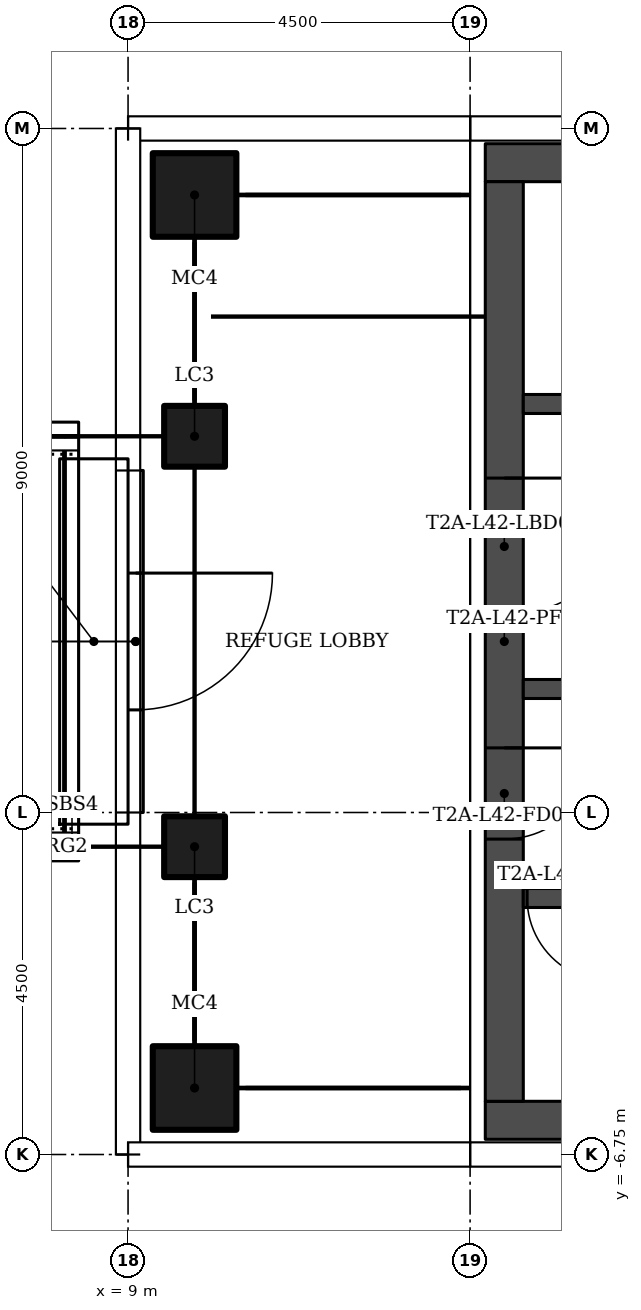
"""IFC4 building model, lengths in metres.
Left out: names, types, materials, properties, quantities, classifications, styles, units other than length and angle.
Written with IfcOpenShell. Run it as: python <this file> out.ifc"""

import sys

from ifc_helpers import new_model, si_unit, direction, frame, frame_2d, origin, origin_2d, place, context, subcontext, project, spatial, rectangle, hollow_rectangle, extrude, element, fill, save


model = new_model("IFC4")
c1 = context("Model", 3, precision=1e-05, world=origin(), true_north=direction((0.0, 1.0)))
c2 = subcontext(c1, "Body", "Model", "MODEL_VIEW")
j1 = project(units=[si_unit("LENGTHUNIT", "METRE"), si_unit("PLANEANGLEUNIT", "RADIAN")], contexts=[c1])
p1 = place(None, origin())
s1 = spatial("IfcSite", under=j1, at=p1, CompositionType="ELEMENT")
p2 = place(p1, origin())
s2 = spatial("IfcBuilding", under=s1, at=p2, CompositionType="ELEMENT")
p3 = place(p2, frame((0.0, 0.0, 177.9)))
s3 = spatial("IfcBuildingStorey", under=s2, at=p3, CompositionType="ELEMENT", Elevation=177.9)
for number, where in (
    (1, (9.875, -5.875, 0.0)),
    (2, (9.875, 5.875, 0.0)),
):
    element("IfcColumn", number, at=place(p3, frame(where)), inside=s3, PredefinedType="COLUMN", context=c2, shape_type="SweptSolid", body=[
        extrude(hollow_rectangle(XDim=1.1, YDim=1.1, WallThickness=0.04, at=origin_2d()), origin(), (0.0, 0.0, 1.0), 4.45),
    ])
for number, where in (
    (3, (9.875, -2.7, 0.0)),
    (4, (9.875, 2.7, 0.0)),
):
    element("IfcColumn", number, at=place(p3, frame(where)), inside=s3, PredefinedType="COLUMN", context=c2, shape_type="SweptSolid", body=[
        extrude(hollow_rectangle(XDim=0.8, YDim=0.8, WallThickness=0.03, at=origin_2d()), origin(), (0.0, 0.0, 1.0), 4.45),
    ])
p4 = place(p3, frame((9.1, 2.25, 0.0), z_axis=(0.0, 0.0, 1.0), x_axis=(0.0, -1.0, 0.0)))
e5 = element("IfcWall", 5, at=p4, inside=s3, PredefinedType="PARTITIONING", context=c2, shape_type="SweptSolid", body=[
    extrude(rectangle(XDim=4.5, YDim=0.2, at=frame_2d((2.25, 0.0))), origin(), (0.0, 0.0, 1.0), 4.45),
])
p5 = place(p4, frame((1.35, 0.0, 0.0)))
e6 = element("IfcOpeningElement", 6, at=p5, cuts=e5, PredefinedType="OPENING", context=c2, shape_type="SweptSolid", body=[
    extrude(rectangle(XDim=1.8, YDim=2.1, at=frame_2d((0.9, 1.05))), frame((0.0, 0.11, 0.0), z_axis=(0.0, -1.0, 0.0), x_axis=(1.0, 0.0, 0.0)), (0.0, 0.0, 1.0), 0.22),
])
for number, where in (
    (7, (13.7, -6.3, 0.0)),
    (8, (13.7, 6.3, 0.0)),
):
    element("IfcWall", number, at=place(p3, frame(where)), inside=s3, PredefinedType="SHEAR", context=c2, shape_type="SweptSolid", body=[
        extrude(rectangle(XDim=13.1, YDim=0.5, at=frame_2d((6.55, 0.0))), origin(), (0.0, 0.0, 1.0), 4.45),
    ])
p6 = place(p3, frame((13.95, 6.05, 0.0), z_axis=(0.0, 0.0, 1.0), x_axis=(0.0, -1.0, 0.0)))
e9 = element("IfcWall", 9, at=p6, inside=s3, PredefinedType="SHEAR", context=c2, shape_type="SweptSolid", body=[
    extrude(rectangle(XDim=12.1, YDim=0.5, at=frame_2d((6.05, 0.0))), origin(), (0.0, 0.0, 1.0), 4.45),
])
p7 = place(p6, frame((7.45, 0.0, 0.0)))
e10 = element("IfcOpeningElement", 10, at=p7, cuts=e9, PredefinedType="OPENING", context=c2, shape_type="SweptSolid", body=[
    extrude(rectangle(XDim=1.2, YDim=2.1, at=frame_2d((0.6, 1.05))), frame((0.0, 0.26, 0.0), z_axis=(0.0, -1.0, 0.0), x_axis=(1.0, 0.0, 0.0)), (0.0, 0.0, 1.0), 0.52),
])
p8 = place(p6, frame((3.9, 0.0, 0.0)))
e11 = element("IfcOpeningElement", 11, at=p8, cuts=e9, PredefinedType="OPENING", context=c2, shape_type="SweptSolid", body=[
    extrude(rectangle(XDim=1.8, YDim=2.4, at=frame_2d((0.9, 1.2))), frame((0.0, 0.26, 0.0), z_axis=(0.0, -1.0, 0.0), x_axis=(1.0, 0.0, 0.0)), (0.0, 0.0, 1.0), 0.52),
])
p9 = place(p3, frame((26.3, -3.375, 0.0), z_axis=(0.0, 0.0, 1.0), x_axis=(-1.0, 0.0, 0.0)))
e12 = element("IfcWall", 12, at=p9, inside=s3, PredefinedType="SHEAR", context=c2, shape_type="SweptSolid", body=[
    extrude(rectangle(XDim=12.1, YDim=0.25, at=frame_2d((6.05, 0.0))), origin(), (0.0, 0.0, 1.0), 4.45),
])
p10 = place(p9, frame((10.95, 0.0, 0.0)))
e13 = element("IfcOpeningElement", 13, at=p10, cuts=e12, PredefinedType="OPENING", context=c2, shape_type="SweptSolid", body=[
    extrude(rectangle(XDim=1.1, YDim=2.1, at=frame_2d((0.55, 1.05))), frame((0.0, 0.135, 0.0), z_axis=(0.0, -1.0, 0.0), x_axis=(1.0, 0.0, 0.0)), (0.0, 0.0, 1.0), 0.27),
])
p11 = place(p3, frame((26.3, -0.625, 0.0), z_axis=(0.0, 0.0, 1.0), x_axis=(-1.0, 0.0, 0.0)))
e14 = element("IfcWall", 14, at=p11, inside=s3, PredefinedType="SHEAR", context=c2, shape_type="SweptSolid", body=[
    extrude(rectangle(XDim=12.1, YDim=0.25, at=frame_2d((6.05, 0.0))), origin(), (0.0, 0.0, 1.0), 4.45),
])
p12 = place(p11, frame((8.65, 0.0, 0.0)))
e15 = element("IfcOpeningElement", 15, at=p12, cuts=e14, PredefinedType="OPENING", context=c2, shape_type="SweptSolid", body=[
    extrude(rectangle(XDim=1.2, YDim=2.1, at=frame_2d((0.6, 1.05))), frame((0.0, 0.135, 0.0), z_axis=(0.0, -1.0, 0.0), x_axis=(1.0, 0.0, 0.0)), (0.0, 0.0, 1.0), 0.27),
])
p13 = place(p11, frame((1.175, 0.0, 0.0)))
e16 = element("IfcOpeningElement", 16, at=p13, cuts=e14, PredefinedType="OPENING", context=c2, shape_type="SweptSolid", body=[
    extrude(rectangle(XDim=0.9, YDim=2.1, at=frame_2d((0.45, 1.05))), frame((0.0, 0.135, 0.0), z_axis=(0.0, -1.0, 0.0), x_axis=(1.0, 0.0, 0.0)), (0.0, 0.0, 1.0), 0.27),
])
p14 = place(p3, frame((14.2, 3.125, 0.0)))
e17 = element("IfcWall", 17, at=p14, inside=s3, PredefinedType="SHEAR", context=c2, shape_type="SweptSolid", body=[
    extrude(rectangle(XDim=12.1, YDim=0.25, at=frame_2d((6.05, 0.0))), origin(), (0.0, 0.0, 1.0), 4.45),
])
p15 = place(p14, frame((6.95, 0.0, 0.0)))
e18 = element("IfcOpeningElement", 18, at=p15, cuts=e17, PredefinedType="OPENING", context=c2, shape_type="SweptSolid", body=[
    extrude(rectangle(XDim=1.1, YDim=2.1, at=frame_2d((0.55, 1.05))), frame((0.0, 0.135, 0.0), z_axis=(0.0, -1.0, 0.0), x_axis=(1.0, 0.0, 0.0)), (0.0, 0.0, 1.0), 0.27),
])
p16 = place(p14, frame((10.075, 0.0, 0.0)))
e19 = element("IfcOpeningElement", 19, at=p16, cuts=e17, PredefinedType="OPENING", context=c2, shape_type="SweptSolid", body=[
    extrude(rectangle(XDim=1.1, YDim=2.1, at=frame_2d((0.55, 1.05))), frame((0.0, 0.135, 0.0), z_axis=(0.0, -1.0, 0.0), x_axis=(1.0, 0.0, 0.0)), (0.0, 0.0, 1.0), 0.27),
])
p17 = place(p14, frame((2.475, 0.0, 0.0)))
e20 = element("IfcOpeningElement", 20, at=p17, cuts=e17, PredefinedType="OPENING", context=c2, shape_type="SweptSolid", body=[
    extrude(rectangle(XDim=0.9, YDim=2.1, at=frame_2d((0.45, 1.05))), frame((0.0, 0.135, 0.0), z_axis=(0.0, -1.0, 0.0), x_axis=(1.0, 0.0, 0.0)), (0.0, 0.0, 1.0), 0.27),
])
p18 = place(p5, origin())
e21 = element("IfcDoor", 21, at=p18, inside=s3, OperationType="DOUBLE_DOOR_SINGLE_SWING", PredefinedType="DOOR", context=c2, shape_type="SweptSolid", body=[
    extrude(rectangle(XDim=1.8, YDim=2.1, at=frame_2d((0.9, 1.05))), frame((0.0, 0.025, 0.0), z_axis=(0.0, -1.0, 0.0), x_axis=(1.0, 0.0, 0.0)), (0.0, 0.0, 1.0), 0.05),
])
fill(e6, e21)
p19 = place(p7, origin())
e22 = element("IfcDoor", 22, at=p19, inside=s3, OperationType="SINGLE_SWING_RIGHT", PredefinedType="DOOR", context=c2, shape_type="SweptSolid", body=[
    extrude(rectangle(XDim=1.2, YDim=2.1, at=frame_2d((0.6, 1.05))), frame((0.0, 0.025, 0.0), z_axis=(0.0, -1.0, 0.0), x_axis=(1.0, 0.0, 0.0)), (0.0, 0.0, 1.0), 0.05),
])
fill(e10, e22)
p20 = place(p8, origin())
e23 = element("IfcDoor", 23, at=p20, inside=s3, OperationType="DOUBLE_DOOR_SINGLE_SWING", PredefinedType="DOOR", context=c2, shape_type="SweptSolid", body=[
    extrude(rectangle(XDim=1.8, YDim=2.4, at=frame_2d((0.9, 1.2))), frame((0.0, 0.025, 0.0), z_axis=(0.0, -1.0, 0.0), x_axis=(1.0, 0.0, 0.0)), (0.0, 0.0, 1.0), 0.05),
])
fill(e11, e23)
p21 = place(p10, origin())
e24 = element("IfcDoor", 24, at=p21, inside=s3, OperationType="SINGLE_SWING_RIGHT", PredefinedType="DOOR", context=c2, shape_type="SweptSolid", body=[
    extrude(rectangle(XDim=1.1, YDim=2.1, at=frame_2d((0.55, 1.05))), frame((0.0, 0.025, 0.0), z_axis=(0.0, -1.0, 0.0), x_axis=(1.0, 0.0, 0.0)), (0.0, 0.0, 1.0), 0.05),
])
fill(e13, e24)
save(model, sys.argv[1])
